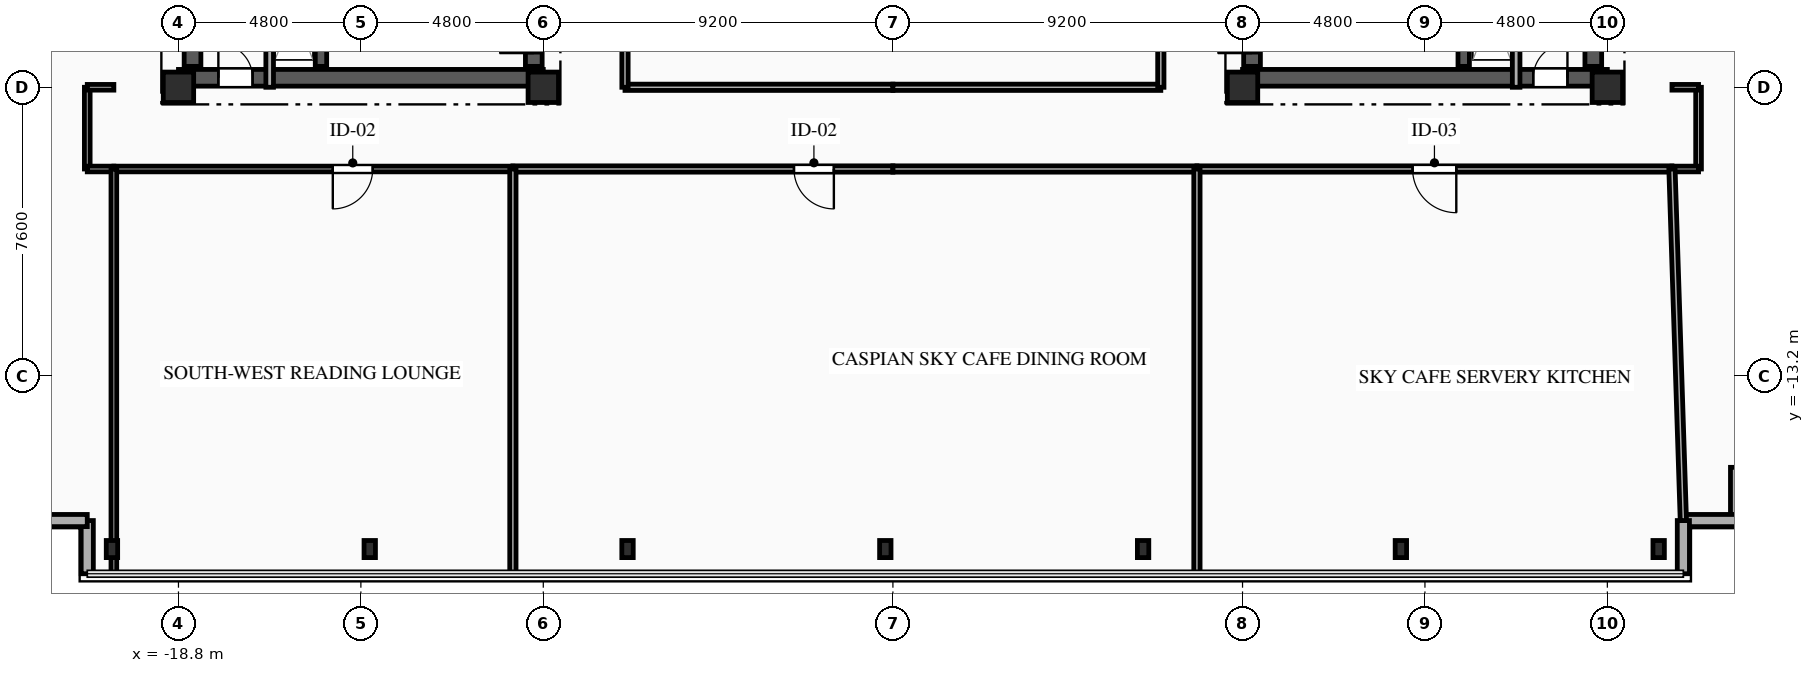
"""IFC4 building model, lengths in metres.
Left out: names, types, materials, properties, quantities, classifications, styles, units other than length and angle.
Written with IfcOpenShell. Run it as: python <this file> out.ifc"""

import sys

from ifc_helpers import new_model, si_unit, direction, frame, frame_2d, origin, origin_2d, place, context, subcontext, project, spatial, rectangle, i_section, extrude, element, fill, save


model = new_model("IFC4")
c1 = context("Model", 3, precision=1e-05, world=origin(), true_north=direction((0.0, 1.0)))
c2 = subcontext(c1, "Body", "Model", "MODEL_VIEW")
j1 = project(units=[si_unit("LENGTHUNIT", "METRE"), si_unit("PLANEANGLEUNIT", "RADIAN")], contexts=[c1])
p1 = place(None, origin())
s1 = spatial("IfcSite", under=j1, at=p1, CompositionType="ELEMENT")
p2 = place(p1, origin())
s2 = spatial("IfcBuilding", under=s1, at=p2, CompositionType="ELEMENT")
p3 = place(p2, frame((0.0, 0.0, 266.0)))
s3 = spatial("IfcBuildingStorey", under=s2, at=p3, CompositionType="ELEMENT", Elevation=266.0)
for number, where, z_axis, x_axis in (
    (1, (-18.8, -5.6, 0.0), (0.0, 0.0, 1.0), (1.0, 0.0, 0.0)),
    (2, (-9.2, -5.6, 0.0), (0.0, 0.0, 1.0), (1.0, 0.0, 0.0)),
    (3, (9.2, -5.6, 0.0), (0.0, 0.0, 1.0), (1.0, 0.0, 0.0)),
    (4, (18.8, -5.6, 0.0), (0.0, 0.0, 1.0), (1.0, 0.0, 0.0)),
):
    element("IfcColumn", number, at=place(p3, frame(where, z_axis=z_axis, x_axis=x_axis)), inside=s3, PredefinedType="COLUMN", context=c2, shape_type="SweptSolid", body=[
        extrude(rectangle(XDim=0.8, YDim=0.8, at=origin_2d()), origin(), (0.0, 0.0, 1.0), 4.2),
    ])
for number, where, z_axis, x_axis in (
    (5, (-20.55, -17.75, 0.0), (0.0, 0.0, 1.0), (1.0, 0.0, 0.0)),
    (6, (-13.767, -17.75, 0.0), (0.0, 0.0, 1.0), (1.0, 0.0, 0.0)),
    (7, (-6.983, -17.75, 0.0), (0.0, 0.0, 1.0), (1.0, 0.0, 0.0)),
    (8, (-0.2, -17.75, 0.0), (0.0, 0.0, 1.0), (1.0, 0.0, 0.0)),
    (9, (6.583, -17.75, 0.0), (0.0, 0.0, 1.0), (1.0, 0.0, 0.0)),
    (10, (13.367, -17.75, 0.0), (0.0, 0.0, 1.0), (1.0, 0.0, 0.0)),
    (11, (20.15, -17.75, 0.0), (0.0, 0.0, 1.0), (1.0, 0.0, 0.0)),
):
    element("IfcColumn", number, at=place(p3, frame(where, z_axis=z_axis, x_axis=x_axis)), inside=s3, PredefinedType="COLUMN", context=c2, shape_type="SweptSolid", body=[
        extrude(i_section(OverallWidth=0.3, OverallDepth=0.45, WebThickness=0.014, FlangeThickness=0.026, FilletRadius=0.027, at=origin_2d()), origin(), (0.0, 0.0, 1.0), 4.2),
    ])
p4 = place(p3, frame((-21.2, -18.4, 0.0), z_axis=(0.0, 0.0, 1.0), x_axis=(0.0, 1.0, 0.0)))
e12 = element("IfcWall", 12, at=p4, inside=s3, PredefinedType="SOLIDWALL", context=c2, shape_type="SweptSolid", body=[
    extrude(rectangle(XDim=1.4, YDim=0.32, at=frame_2d((0.7, 0.0))), origin(), (0.0, 0.0, 1.0), 3.8),
])
p5 = place(p3, frame((-21.2, -17.0, 0.0), z_axis=(0.0, 0.0, 1.0), x_axis=(-1.0, 0.0, 0.0)))
e13 = element("IfcWall", 13, at=p5, inside=s3, PredefinedType="SOLIDWALL", context=c2, shape_type="SweptSolid", body=[
    extrude(rectangle(XDim=1.4, YDim=0.32, at=frame_2d((0.7, 0.0))), origin(), (0.0, 0.0, 1.0), 3.8),
])
for number, where, z_axis, x_axis in (
    (14, (22.2, -15.6, 0.0), (0.0, 0.0, 1.0), (0.0, -1.0, 0.0)),
    (15, (22.2, -17.0, 0.0), (0.0, 0.0, 1.0), (-1.0, 0.0, 0.0)),
    (16, (20.8, -17.0, 0.0), (0.0, 0.0, 1.0), (0.0, -1.0, 0.0)),
):
    element("IfcWall", number, at=place(p3, frame(where, z_axis=z_axis, x_axis=x_axis)), inside=s3, PredefinedType="SOLIDWALL", context=c2, shape_type="SweptSolid", body=[
        extrude(rectangle(XDim=1.4, YDim=0.32, at=frame_2d((0.7, 0.0))), origin(), (0.0, 0.0, 1.0), 3.8),
    ])
p6 = place(p3, frame((-18.8, -5.35, 0.0), z_axis=(0.0, 0.0, 1.0), x_axis=(1.0, 0.0, 0.0)))
e17 = element("IfcWall", 17, at=p6, inside=s3, PredefinedType="SHEAR", context=c2, shape_type="SweptSolid", body=[
    extrude(rectangle(XDim=9.6, YDim=0.44, at=frame_2d((4.8, 0.0))), origin(), (0.0, 0.0, 1.0), 3.8),
])
p7 = place(p6, frame((1.05, 0.0, 0.0)))
e18 = element("IfcOpeningElement", 18, at=p7, cuts=e17, PredefinedType="OPENING", context=c2, shape_type="SweptSolid", body=[
    extrude(rectangle(XDim=0.9, YDim=2.1, at=frame_2d((0.45, 1.05))), frame((0.0, 0.23, 0.0), z_axis=(0.0, -1.0, 0.0), x_axis=(1.0, 0.0, 0.0)), (0.0, 0.0, 1.0), 0.46),
])
p8 = place(p3, frame((-18.43, -5.05, 0.0), z_axis=(0.0, 0.0, 1.0), x_axis=(0.0, 1.0, 0.0)))
e19 = element("IfcWall", 19, at=p8, inside=s3, PredefinedType="SHEAR", context=c2, shape_type="SweptSolid", body=[
    extrude(rectangle(XDim=10.1, YDim=0.44, at=frame_2d((5.05, 0.0))), origin(), (0.0, 0.0, 1.0), 3.8),
])
p9 = place(p3, frame((-9.45, -5.05, 0.0), z_axis=(0.0, 0.0, 1.0), x_axis=(0.0, 1.0, 0.0)))
e20 = element("IfcWall", 20, at=p9, inside=s3, PredefinedType="SHEAR", context=c2, shape_type="SweptSolid", body=[
    extrude(rectangle(XDim=10.1, YDim=0.44, at=frame_2d((5.05, 0.0))), origin(), (0.0, 0.0, 1.0), 3.8),
])
p10 = place(p9, frame((7.15, 0.0, 0.0)))
e21 = element("IfcOpeningElement", 21, at=p10, cuts=e20, PredefinedType="OPENING", context=c2, shape_type="SweptSolid", body=[
    extrude(rectangle(XDim=0.9, YDim=2.1, at=frame_2d((0.45, 1.05))), frame((0.0, 0.23, 0.0), z_axis=(0.0, -1.0, 0.0), x_axis=(1.0, 0.0, 0.0)), (0.0, 0.0, 1.0), 0.46),
])
p11 = place(p9, frame((2.4, 0.0, 0.0)))
e22 = element("IfcOpeningElement", 22, at=p11, cuts=e20, PredefinedType="OPENING", context=c2, shape_type="SweptSolid", body=[
    extrude(rectangle(XDim=1.2, YDim=2.15, at=frame_2d((0.6, 1.075))), frame((0.0, 0.23, 0.0), z_axis=(0.0, -1.0, 0.0), x_axis=(1.0, 0.0, 0.0)), (0.0, 0.0, 1.0), 0.46),
])
p12 = place(p9, frame((0.35, 0.0, 0.0)))
e23 = element("IfcOpeningElement", 23, at=p12, cuts=e20, PredefinedType="OPENING", context=c2, shape_type="SweptSolid", body=[
    extrude(rectangle(XDim=0.9, YDim=2.1, at=frame_2d((0.45, 1.05))), frame((0.0, 0.23, 0.0), z_axis=(0.0, -1.0, 0.0), x_axis=(1.0, 0.0, 0.0)), (0.0, 0.0, 1.0), 0.46),
])
p13 = place(p9, frame((5.0, 0.0, 0.0)))
e24 = element("IfcOpeningElement", 24, at=p13, cuts=e20, PredefinedType="OPENING", context=c2, shape_type="SweptSolid", body=[
    extrude(rectangle(XDim=0.9, YDim=2.1, at=frame_2d((0.45, 1.05))), frame((0.0, 0.23, 0.0), z_axis=(0.0, -1.0, 0.0), x_axis=(1.0, 0.0, 0.0)), (0.0, 0.0, 1.0), 0.46),
])
p14 = place(p3, frame((-15.05, -5.05, 0.0), z_axis=(0.0, 0.0, 1.0), x_axis=(0.0, 1.0, 0.0)))
e25 = element("IfcWall", 25, at=p14, inside=s3, PredefinedType="SHEAR", context=c2, shape_type="SweptSolid", body=[
    extrude(rectangle(XDim=10.1, YDim=0.3, at=frame_2d((5.05, 0.0))), origin(), (0.0, 0.0, 1.0), 3.8),
])
p15 = place(p3, frame((9.2, -5.35, 0.0), z_axis=(0.0, 0.0, 1.0), x_axis=(1.0, 0.0, 0.0)))
e26 = element("IfcWall", 26, at=p15, inside=s3, PredefinedType="SHEAR", context=c2, shape_type="SweptSolid", body=[
    extrude(rectangle(XDim=9.6, YDim=0.44, at=frame_2d((4.8, 0.0))), origin(), (0.0, 0.0, 1.0), 3.8),
])
p16 = place(p15, frame((7.65, 0.0, 0.0)))
e27 = element("IfcOpeningElement", 27, at=p16, cuts=e26, PredefinedType="OPENING", context=c2, shape_type="SweptSolid", body=[
    extrude(rectangle(XDim=0.9, YDim=2.1, at=frame_2d((0.45, 1.05))), frame((0.0, 0.23, 0.0), z_axis=(0.0, -1.0, 0.0), x_axis=(1.0, 0.0, 0.0)), (0.0, 0.0, 1.0), 0.46),
])
p17 = place(p3, frame((9.45, -5.05, 0.0), z_axis=(0.0, 0.0, 1.0), x_axis=(0.0, 1.0, 0.0)))
e28 = element("IfcWall", 28, at=p17, inside=s3, PredefinedType="SHEAR", context=c2, shape_type="SweptSolid", body=[
    extrude(rectangle(XDim=10.1, YDim=0.44, at=frame_2d((5.05, 0.0))), origin(), (0.0, 0.0, 1.0), 3.8),
])
p18 = place(p17, frame((7.15, 0.0, 0.0)))
e29 = element("IfcOpeningElement", 29, at=p18, cuts=e28, PredefinedType="OPENING", context=c2, shape_type="SweptSolid", body=[
    extrude(rectangle(XDim=0.9, YDim=2.1, at=frame_2d((0.45, 1.05))), frame((0.0, 0.23, 0.0), z_axis=(0.0, -1.0, 0.0), x_axis=(1.0, 0.0, 0.0)), (0.0, 0.0, 1.0), 0.46),
])
p19 = place(p17, frame((2.4, 0.0, 0.0)))
e30 = element("IfcOpeningElement", 30, at=p19, cuts=e28, PredefinedType="OPENING", context=c2, shape_type="SweptSolid", body=[
    extrude(rectangle(XDim=1.2, YDim=2.15, at=frame_2d((0.6, 1.075))), frame((0.0, 0.23, 0.0), z_axis=(0.0, -1.0, 0.0), x_axis=(1.0, 0.0, 0.0)), (0.0, 0.0, 1.0), 0.46),
])
p20 = place(p17, frame((0.35, 0.0, 0.0)))
e31 = element("IfcOpeningElement", 31, at=p20, cuts=e28, PredefinedType="OPENING", context=c2, shape_type="SweptSolid", body=[
    extrude(rectangle(XDim=0.9, YDim=2.1, at=frame_2d((0.45, 1.05))), frame((0.0, 0.23, 0.0), z_axis=(0.0, -1.0, 0.0), x_axis=(1.0, 0.0, 0.0)), (0.0, 0.0, 1.0), 0.46),
])
p21 = place(p3, frame((18.43, -5.05, 0.0), z_axis=(0.0, 0.0, 1.0), x_axis=(0.0, 1.0, 0.0)))
e32 = element("IfcWall", 32, at=p21, inside=s3, PredefinedType="SHEAR", context=c2, shape_type="SweptSolid", body=[
    extrude(rectangle(XDim=10.1, YDim=0.44, at=frame_2d((5.05, 0.0))), origin(), (0.0, 0.0, 1.0), 3.8),
])
p22 = place(p3, frame((15.02, -5.05, 0.0), z_axis=(0.0, 0.0, 1.0), x_axis=(0.0, 1.0, 0.0)))
e33 = element("IfcWall", 33, at=p22, inside=s3, PredefinedType="SHEAR", context=c2, shape_type="SweptSolid", body=[
    extrude(rectangle(XDim=10.1, YDim=0.3, at=frame_2d((5.05, 0.0))), origin(), (0.0, 0.0, 1.0), 3.8),
])
for number, where, z_axis, x_axis in (
    (34, (-16.4, -5.6, 0.0), (0.0, 0.0, 1.0), (0.0, 1.0, 0.0)),
    (35, (16.4, -2.11, 0.0), (0.0, 0.0, 1.0), (0.0, -1.0, 0.0)),
):
    element("IfcWall", number, at=place(p3, frame(where, z_axis=z_axis, x_axis=x_axis)), inside=s3, PredefinedType="PARTITIONING", context=c2, shape_type="SweptSolid", body=[
        extrude(rectangle(XDim=3.49, YDim=0.2, at=frame_2d((1.745, 0.0))), origin(), (0.0, 0.0, 1.0), 3.8),
    ])
p23 = place(p3, frame((-7.05, -5.6, 0.0), z_axis=(0.0, 0.0, 1.0), x_axis=(1.0, 0.0, 0.0)))
e36 = element("IfcWall", 36, at=p23, inside=s3, PredefinedType="PARTITIONING", context=c2, shape_type="SweptSolid", body=[
    extrude(rectangle(XDim=7.05, YDim=0.165, at=frame_2d((3.525, 0.0))), origin(), (0.0, 0.0, 1.0), 3.285),
])
p24 = place(p3, frame((0.0, -7.75, 0.0), z_axis=(0.0, 0.0, 1.0), x_axis=(-1.0, 0.0, 0.0)))
e37 = element("IfcWall", 37, at=p24, inside=s3, PredefinedType="PARTITIONING", context=c2, shape_type="SweptSolid", body=[
    extrude(rectangle(XDim=10.0, YDim=0.165, at=frame_2d((5.0, 0.0))), origin(), (0.0, 0.0, 1.0), 3.8),
])
p25 = place(p24, frame((1.554, 0.0, 0.0)))
e38 = element("IfcOpeningElement", 38, at=p25, cuts=e37, PredefinedType="OPENING", context=c2, shape_type="SweptSolid", body=[
    extrude(rectangle(XDim=1.05, YDim=2.15, at=frame_2d((0.525, 1.075))), frame((0.0, 0.093, 0.0), z_axis=(0.0, -1.0, 0.0), x_axis=(1.0, 0.0, 0.0)), (0.0, 0.0, 1.0), 0.185),
])
p26 = place(p3, frame((-10.0, -7.75, 0.0), z_axis=(0.0, 0.0, 1.0), x_axis=(-1.0, 0.0, 0.0)))
e39 = element("IfcWall", 39, at=p26, inside=s3, PredefinedType="PARTITIONING", context=c2, shape_type="SweptSolid", body=[
    extrude(rectangle(XDim=10.5, YDim=0.15, at=frame_2d((5.25, 0.0))), origin(), (0.0, 0.0, 1.0), 3.8),
])
p27 = place(p26, frame((3.689, 0.0, 0.0)))
e40 = element("IfcOpeningElement", 40, at=p27, cuts=e39, PredefinedType="OPENING", context=c2, shape_type="SweptSolid", body=[
    extrude(rectangle(XDim=1.05, YDim=2.15, at=frame_2d((0.525, 1.075))), frame((0.0, 0.085, 0.0), z_axis=(0.0, -1.0, 0.0), x_axis=(1.0, 0.0, 0.0)), (0.0, 0.0, 1.0), 0.17),
])
p28 = place(p3, frame((-21.2, -7.75, 0.0), z_axis=(0.0, 0.0, 1.0), x_axis=(0.0, 1.0, 0.0)))
e41 = element("IfcWall", 41, at=p28, inside=s3, PredefinedType="PARTITIONING", context=c2, shape_type="SweptSolid", body=[
    extrude(rectangle(XDim=2.15, YDim=0.15, at=frame_2d((1.075, 0.0))), origin(), (0.0, 0.0, 1.0), 3.455),
])
for number, where, z_axis, x_axis in (
    (42, (-20.5, -7.75, 0.0), (0.0, 0.0, 1.0), (-1.0, 0.0, 0.0)),
    (43, (-21.2, -5.6, 0.0), (0.0, 0.0, 1.0), (1.0, 0.0, 0.0)),
):
    element("IfcWall", number, at=place(p3, frame(where, z_axis=z_axis, x_axis=x_axis)), inside=s3, PredefinedType="PARTITIONING", context=c2, shape_type="SweptSolid", body=[
        extrude(rectangle(XDim=0.7, YDim=0.15, at=frame_2d((0.35, 0.0))), origin(), (0.0, 0.0, 1.0), 3.8),
    ])
p29 = place(p3, frame((0.0, -5.6, 0.0), z_axis=(0.0, 0.0, 1.0), x_axis=(1.0, 0.0, 0.0)))
e44 = element("IfcWall", 44, at=p29, inside=s3, PredefinedType="PARTITIONING", context=c2, shape_type="SweptSolid", body=[
    extrude(rectangle(XDim=7.05, YDim=0.165, at=frame_2d((3.525, 0.0))), origin(), (0.0, 0.0, 1.0), 3.285),
])
p30 = place(p3, frame((8.0, -7.75, 0.0), z_axis=(0.0, 0.0, 1.0), x_axis=(-1.0, 0.0, 0.0)))
e45 = element("IfcWall", 45, at=p30, inside=s3, PredefinedType="PARTITIONING", context=c2, shape_type="SweptSolid", body=[
    extrude(rectangle(XDim=8.0, YDim=0.165, at=frame_2d((4.0, 0.0))), origin(), (0.0, 0.0, 1.0), 3.8),
])
p31 = place(p3, frame((20.5, -7.75, 0.0), z_axis=(0.0, 0.0, 1.0), x_axis=(-1.0, 0.0, 0.0)))
e46 = element("IfcWall", 46, at=p31, inside=s3, PredefinedType="PARTITIONING", context=c2, shape_type="SweptSolid", body=[
    extrude(rectangle(XDim=12.5, YDim=0.165, at=frame_2d((6.25, 0.0))), origin(), (0.0, 0.0, 1.0), 3.8),
])
p32 = place(p31, frame((5.675, 0.0, 0.0)))
e47 = element("IfcOpeningElement", 47, at=p32, cuts=e46, PredefinedType="OPENING", context=c2, shape_type="SweptSolid", body=[
    extrude(rectangle(XDim=1.15, YDim=2.15, at=frame_2d((0.575, 1.075))), frame((0.0, 0.093, 0.0), z_axis=(0.0, -1.0, 0.0), x_axis=(1.0, 0.0, 0.0)), (0.0, 0.0, 1.0), 0.185),
])
p33 = place(p3, frame((21.2, -5.6, 0.0), z_axis=(0.0, 0.0, 1.0), x_axis=(0.0, -1.0, 0.0)))
e48 = element("IfcWall", 48, at=p33, inside=s3, PredefinedType="PARTITIONING", context=c2, shape_type="SweptSolid", body=[
    extrude(rectangle(XDim=2.15, YDim=0.15, at=frame_2d((1.075, 0.0))), origin(), (0.0, 0.0, 1.0), 3.8),
])
for number, where, z_axis, x_axis in (
    (49, (20.5, -5.6, 0.0), (0.0, 0.0, 1.0), (1.0, 0.0, 0.0)),
    (50, (21.2, -7.75, 0.0), (0.0, 0.0, 1.0), (-1.0, 0.0, 0.0)),
):
    element("IfcWall", number, at=place(p3, frame(where, z_axis=z_axis, x_axis=x_axis)), inside=s3, PredefinedType="PARTITIONING", context=c2, shape_type="SweptSolid", body=[
        extrude(rectangle(XDim=0.7, YDim=0.15, at=frame_2d((0.35, 0.0))), origin(), (0.0, 0.0, 1.0), 3.8),
    ])
p34 = place(p3, frame((-7.05, 8.5, 0.0), z_axis=(0.0, 0.0, 1.0), x_axis=(0.0, -1.0, 0.0)))
e51 = element("IfcWall", 51, at=p34, inside=s3, PredefinedType="PARTITIONING", context=c2, shape_type="SweptSolid", body=[
    extrude(rectangle(XDim=14.1, YDim=0.165, at=frame_2d((7.05, 0.0))), origin(), (0.0, 0.0, 1.0), 3.8),
])
p35 = place(p34, frame((8.011, 0.0, 0.0)))
e52 = element("IfcOpeningElement", 52, at=p35, cuts=e51, PredefinedType="OPENING", context=c2, shape_type="SweptSolid", body=[
    extrude(rectangle(XDim=1.05, YDim=2.15, at=frame_2d((0.525, 1.075))), frame((0.0, 0.093, 0.0), z_axis=(0.0, -1.0, 0.0), x_axis=(1.0, 0.0, 0.0)), (0.0, 0.0, 1.0), 0.185),
])
p36 = place(p3, frame((7.05, -5.6, 0.0), z_axis=(0.0, 0.0, 1.0), x_axis=(0.0, 1.0, 0.0)))
e53 = element("IfcWall", 53, at=p36, inside=s3, PredefinedType="PARTITIONING", context=c2, shape_type="SweptSolid", body=[
    extrude(rectangle(XDim=14.1, YDim=0.165, at=frame_2d((7.05, 0.0))), origin(), (0.0, 0.0, 1.0), 3.8),
])
p37 = place(p3, frame((-10.0, -18.4, 0.0), z_axis=(0.0, 0.0, 1.0), x_axis=(0.0, 1.0, 0.0)))
e54 = element("IfcWall", 54, at=p37, inside=s3, PredefinedType="PARTITIONING", context=c2, shape_type="SweptSolid", body=[
    extrude(rectangle(XDim=10.65, YDim=0.165, at=frame_2d((5.325, 0.0))), origin(), (0.0, 0.0, 1.0), 3.8),
])
p38 = place(p3, frame((8.0, -7.75, 0.0), z_axis=(0.0, 0.0, 1.0), x_axis=(0.0, -1.0, 0.0)))
e55 = element("IfcWall", 55, at=p38, inside=s3, PredefinedType="PARTITIONING", context=c2, shape_type="SweptSolid", body=[
    extrude(rectangle(XDim=10.65, YDim=0.165, at=frame_2d((5.325, 0.0))), origin(), (0.0, 0.0, 1.0), 3.425),
])
p39 = place(p3, frame((-20.5, -18.4, 0.0), z_axis=(0.0, 0.0, 1.0), x_axis=(0.0, 1.0, 0.0)))
e56 = element("IfcWall", 56, at=p39, inside=s3, PredefinedType="PARTITIONING", context=c2, shape_type="SweptSolid", body=[
    extrude(rectangle(XDim=10.65, YDim=0.15, at=frame_2d((5.325, 0.0))), origin(), (0.0, 0.0, 1.0), 3.425),
])
p40 = place(p3, frame((20.5, -7.75, 0.0), z_axis=(0.0, 0.0, 1.0), x_axis=(0.032420659042, -0.99947431226, 0.0)))
e57 = element("IfcWall", 57, at=p40, inside=s3, PredefinedType="PARTITIONING", context=c2, shape_type="SweptSolid", body=[
    extrude(rectangle(XDim=9.255, YDim=0.165, at=frame_2d((4.627, 0.0))), origin(), (0.0, 0.0, 1.0), 3.8),
])
p41 = place(p7, origin())
e58 = element("IfcDoor", 58, at=p41, inside=s3, OperationType="SINGLE_SWING_LEFT", PredefinedType="DOOR", context=c2, shape_type="SweptSolid", body=[
    extrude(rectangle(XDim=0.9, YDim=2.1, at=frame_2d((0.45, 1.05))), frame((0.0, 0.025, 0.0), z_axis=(0.0, -1.0, 0.0), x_axis=(1.0, 0.0, 0.0)), (0.0, 0.0, 1.0), 0.05),
])
fill(e18, e58)
p42 = place(p16, origin())
e59 = element("IfcDoor", 59, at=p42, inside=s3, OperationType="SINGLE_SWING_RIGHT", PredefinedType="DOOR", context=c2, shape_type="SweptSolid", body=[
    extrude(rectangle(XDim=0.9, YDim=2.1, at=frame_2d((0.45, 1.05))), frame((0.0, 0.025, 0.0), z_axis=(0.0, -1.0, 0.0), x_axis=(1.0, 0.0, 0.0)), (0.0, 0.0, 1.0), 0.05),
])
fill(e27, e59)
p43 = place(p12, origin())
e60 = element("IfcDoor", 60, at=p43, inside=s3, OperationType="SINGLE_SWING_LEFT", PredefinedType="DOOR", context=c2, shape_type="SweptSolid", body=[
    extrude(rectangle(XDim=0.9, YDim=2.1, at=frame_2d((0.45, 1.05))), frame((0.0, 0.025, 0.0), z_axis=(0.0, -1.0, 0.0), x_axis=(1.0, 0.0, 0.0)), (0.0, 0.0, 1.0), 0.05),
])
fill(e23, e60)
p44 = place(p20, origin())
e61 = element("IfcDoor", 61, at=p44, inside=s3, OperationType="SINGLE_SWING_LEFT", PredefinedType="DOOR", context=c2, shape_type="SweptSolid", body=[
    extrude(rectangle(XDim=0.9, YDim=2.1, at=frame_2d((0.45, 1.05))), frame((0.0, 0.025, 0.0), z_axis=(0.0, -1.0, 0.0), x_axis=(1.0, 0.0, 0.0)), (0.0, 0.0, 1.0), 0.05),
])
fill(e31, e61)
p45 = place(p25, origin())
e62 = element("IfcDoor", 62, at=p45, inside=s3, OperationType="SINGLE_SWING_LEFT", PredefinedType="DOOR", context=c2, shape_type="SweptSolid", body=[
    extrude(rectangle(XDim=1.05, YDim=2.15, at=frame_2d((0.525, 1.075))), frame((0.0, 0.025, 0.0), z_axis=(0.0, -1.0, 0.0), x_axis=(1.0, 0.0, 0.0)), (0.0, 0.0, 1.0), 0.05),
])
fill(e38, e62)
p46 = place(p27, origin())
e63 = element("IfcDoor", 63, at=p46, inside=s3, OperationType="SINGLE_SWING_RIGHT", PredefinedType="DOOR", context=c2, shape_type="SweptSolid", body=[
    extrude(rectangle(XDim=1.05, YDim=2.15, at=frame_2d((0.525, 1.075))), frame((0.0, 0.025, 0.0), z_axis=(0.0, -1.0, 0.0), x_axis=(1.0, 0.0, 0.0)), (0.0, 0.0, 1.0), 0.05),
])
fill(e40, e63)
p47 = place(p32, origin())
e64 = element("IfcDoor", 64, at=p47, inside=s3, OperationType="SINGLE_SWING_LEFT", PredefinedType="DOOR", context=c2, shape_type="SweptSolid", body=[
    extrude(rectangle(XDim=1.15, YDim=2.15, at=frame_2d((0.575, 1.075))), frame((0.0, 0.025, 0.0), z_axis=(0.0, -1.0, 0.0), x_axis=(1.0, 0.0, 0.0)), (0.0, 0.0, 1.0), 0.05),
])
fill(e47, e64)
save(model, sys.argv[1])
